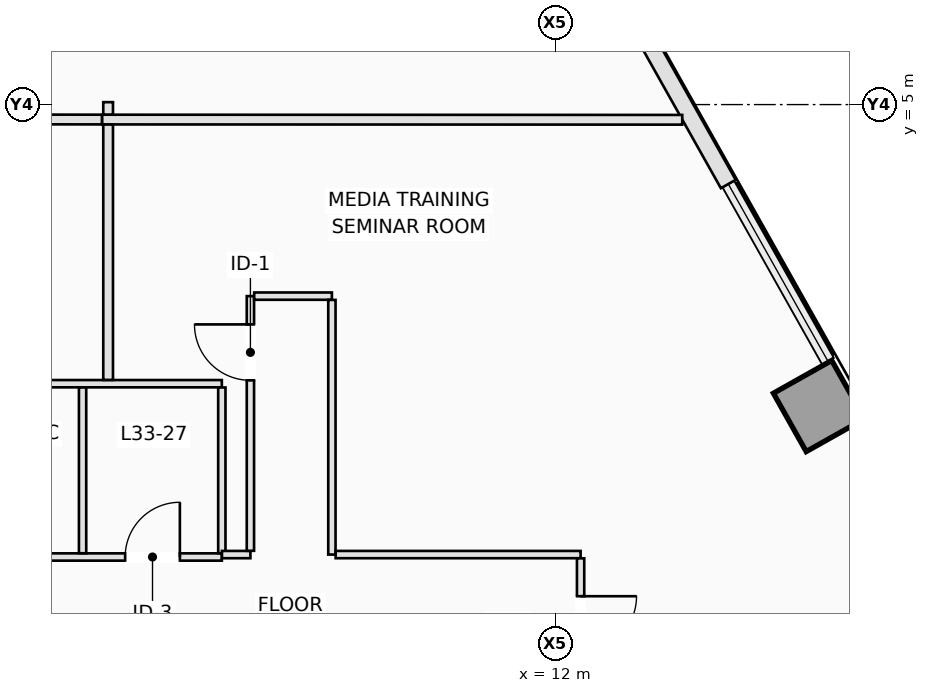
"""IFC4 building model, lengths in metres.
Left out: names, types, materials, properties, quantities, classifications, styles, units other than length and angle.
Written with IfcOpenShell. Run it as: python <this file> out.ifc"""

import sys

from ifc_helpers import new_model, si_unit, direction, frame, frame_2d, origin, origin_2d, place, context, subcontext, project, spatial, rectangle, extrude, element, fill, save


model = new_model("IFC4")
c1 = context("Model", 3, precision=1e-05, world=origin(), true_north=direction((0.0, 1.0)))
c2 = subcontext(c1, "Body", "Model", "MODEL_VIEW")
j1 = project(units=[si_unit("LENGTHUNIT", "METRE"), si_unit("PLANEANGLEUNIT", "RADIAN")], contexts=[c1])
p1 = place(None, origin())
s1 = spatial("IfcSite", under=j1, at=p1, CompositionType="ELEMENT")
p2 = place(p1, origin())
s2 = spatial("IfcBuilding", under=s1, at=p2, CompositionType="ELEMENT")
p3 = place(p2, frame((0.0, 0.0, 123.0)))
s3 = spatial("IfcBuildingStorey", under=s2, at=p3, CompositionType="ELEMENT", Elevation=123.0)
p4 = place(p3, frame((16.33, 0.043, 0.0), z_axis=(0.0, 0.0, 1.0), x_axis=(0.871575139605, 0.490261946333, 0.0)))
e1 = element("IfcColumn", 1, at=p4, inside=s3, PredefinedType="COLUMN", context=c2, shape_type="SweptSolid", body=[
    extrude(rectangle(XDim=1.1, YDim=1.1, at=origin_2d()), origin(), (0.0, 0.0, 1.0), 3.5),
])
p5 = place(p3, frame((13.232, 6.55, 0.0), z_axis=(0.0, 0.0, 1.0), x_axis=(0.490310760781, -0.871547679626, 0.0)))
e2 = element("IfcWall", 2, at=p5, inside=s3, PredefinedType="STANDARD", context=c2, shape_type="SweptSolid", body=[
    extrude(rectangle(XDim=3.277, YDim=0.28, at=frame_2d((1.638, 0.0))), origin(), (0.0, 0.0, 1.0), 3.25),
])
p6 = place(p3, frame((1.94, -2.44, 0.0), z_axis=(0.0, 0.0, 1.0), x_axis=(1.0, 0.0, 0.0)))
e3 = element("IfcWall", 3, at=p6, inside=s3, PredefinedType="PARTITIONING", context=c2, shape_type="SweptSolid", body=[
    extrude(rectangle(XDim=4.57, YDim=0.12, at=frame_2d((2.285, 0.0))), origin(), (0.0, 0.0, 1.0), 3.25),
])
p7 = place(p6, frame((0.7, 0.0, 0.0)))
e4 = element("IfcOpeningElement", 4, at=p7, cuts=e3, PredefinedType="OPENING", context=c2, shape_type="SweptSolid", body=[
    extrude(rectangle(XDim=0.9, YDim=2.12, at=frame_2d((0.45, 1.06))), frame((0.0, 0.07, 0.0), z_axis=(0.0, -1.0, 0.0), x_axis=(1.0, 0.0, 0.0)), (0.0, 0.0, 1.0), 0.14),
])
p8 = place(p6, frame((2.98, 0.0, 0.0)))
e5 = element("IfcOpeningElement", 5, at=p8, cuts=e3, PredefinedType="OPENING", context=c2, shape_type="SweptSolid", body=[
    extrude(rectangle(XDim=0.9, YDim=2.12, at=frame_2d((0.45, 1.06))), frame((0.0, 0.07, 0.0), z_axis=(0.0, -1.0, 0.0), x_axis=(1.0, 0.0, 0.0)), (0.0, 0.0, 1.0), 0.14),
])
p9 = place(p3, frame((1.94, 0.41, 0.0), z_axis=(0.0, 0.0, 1.0), x_axis=(1.0, 0.0, 0.0)))
e6 = element("IfcWall", 6, at=p9, inside=s3, PredefinedType="PARTITIONING", context=c2, shape_type="SweptSolid", body=[
    extrude(rectangle(XDim=4.57, YDim=0.12, at=frame_2d((2.285, 0.0))), origin(), (0.0, 0.0, 1.0), 3.25),
])
p10 = place(p3, frame((4.22, -2.378, 0.0), z_axis=(0.0, 0.0, 1.0), x_axis=(0.0, 1.0, 0.0)))
e7 = element("IfcWall", 7, at=p10, inside=s3, PredefinedType="PARTITIONING", context=c2, shape_type="SweptSolid", body=[
    extrude(rectangle(XDim=2.726, YDim=0.12, at=frame_2d((1.363, 0.0))), origin(), (0.0, 0.0, 1.0), 2.648),
])
p11 = place(p3, frame((6.51, -2.378, 0.0), z_axis=(0.0, 0.0, 1.0), x_axis=(0.0, 1.0, 0.0)))
e8 = element("IfcWall", 8, at=p11, inside=s3, PredefinedType="PARTITIONING", context=c2, shape_type="SweptSolid", body=[
    extrude(rectangle(XDim=2.726, YDim=0.12, at=frame_2d((1.363, 0.0))), origin(), (0.0, 0.0, 1.0), 3.25),
])
p12 = place(p3, frame((6.512, -2.4, 0.0), z_axis=(0.0, 0.0, 1.0), x_axis=(1.0, 0.0, 0.0)))
e9 = element("IfcWall", 9, at=p12, inside=s3, PredefinedType="PARTITIONING", context=c2, shape_type="SweptSolid", body=[
    extrude(rectangle(XDim=0.468, YDim=0.12, at=frame_2d((0.234, 0.0))), origin(), (0.0, 0.0, 1.0), 3.25),
])
p13 = place(p3, frame((6.98, -2.338, 0.0), z_axis=(0.0, 0.0, 1.0), x_axis=(0.0, 1.0, 0.0)))
e10 = element("IfcWall", 10, at=p13, inside=s3, PredefinedType="PARTITIONING", context=c2, shape_type="SweptSolid", body=[
    extrude(rectangle(XDim=4.188, YDim=0.12, at=frame_2d((2.094, 0.0))), origin(), (0.0, 0.0, 1.0), 3.25),
])
p14 = place(p13, frame((2.803, 0.0, 0.0)))
e11 = element("IfcOpeningElement", 11, at=p14, cuts=e10, PredefinedType="OPENING", context=c2, shape_type="SweptSolid", body=[
    extrude(rectangle(XDim=0.92, YDim=2.12, at=frame_2d((0.46, 1.06))), frame((0.0, 0.07, 0.0), z_axis=(0.0, -1.0, 0.0), x_axis=(1.0, 0.0, 0.0)), (0.0, 0.0, 1.0), 0.14),
])
p15 = place(p3, frame((7.042, 1.85, 0.0), z_axis=(0.0, 0.0, 1.0), x_axis=(1.0, 0.0, 0.0)))
e12 = element("IfcWall", 12, at=p15, inside=s3, PredefinedType="PARTITIONING", context=c2, shape_type="SweptSolid", body=[
    extrude(rectangle(XDim=1.278, YDim=0.12, at=frame_2d((0.639, 0.0))), origin(), (0.0, 0.0, 1.0), 3.25),
])
p16 = place(p3, frame((8.32, 1.788, 0.0), z_axis=(0.0, 0.0, 1.0), x_axis=(0.0, -1.0, 0.0)))
e13 = element("IfcWall", 13, at=p16, inside=s3, PredefinedType="PARTITIONING", context=c2, shape_type="SweptSolid", body=[
    extrude(rectangle(XDim=4.188, YDim=0.12, at=frame_2d((2.094, 0.0))), origin(), (0.0, 0.0, 1.0), 3.25),
])
p17 = place(p3, frame((8.382, -2.4, 0.0), z_axis=(0.0, 0.0, 1.0), x_axis=(1.0, 0.0, 0.0)))
e14 = element("IfcWall", 14, at=p17, inside=s3, PredefinedType="PARTITIONING", context=c2, shape_type="SweptSolid", body=[
    extrude(rectangle(XDim=4.028, YDim=0.12, at=frame_2d((2.014, 0.0))), origin(), (0.0, 0.0, 1.0), 3.25),
])
p18 = place(p3, frame((12.41, -2.462, 0.0), z_axis=(0.0, 0.0, 1.0), x_axis=(0.0, -1.0, 0.0)))
e15 = element("IfcWall", 15, at=p18, inside=s3, PredefinedType="PARTITIONING", context=c2, shape_type="SweptSolid", body=[
    extrude(rectangle(XDim=1.786, YDim=0.12, at=frame_2d((0.893, 0.0))), origin(), (0.0, 0.0, 1.0), 3.25),
])
p19 = place(p18, frame((0.623, 0.0, 0.0)))
e16 = element("IfcOpeningElement", 16, at=p19, cuts=e15, PredefinedType="OPENING", context=c2, shape_type="SweptSolid", body=[
    extrude(rectangle(XDim=0.92, YDim=2.12, at=frame_2d((0.46, 1.06))), frame((0.0, 0.07, 0.0), z_axis=(0.0, -1.0, 0.0), x_axis=(1.0, 0.0, 0.0)), (0.0, 0.0, 1.0), 0.14),
])
p20 = place(p3, frame((14.082, 4.75, 0.0), z_axis=(0.0, 0.0, 1.0), x_axis=(-0.999999926346, 0.000383808375, 0.0)))
e17 = element("IfcWall", 17, at=p20, inside=s3, PredefinedType="PARTITIONING", context=c2, shape_type="SweptSolid", body=[
    extrude(rectangle(XDim=9.542, YDim=0.16, at=frame_2d((4.771, 0.0))), origin(), (0.0, 0.0, 1.0), 3.25),
])
p21 = place(p3, frame((4.538, 4.754, 0.0), z_axis=(0.0, 0.0, 1.0), x_axis=(-0.999999181944, 0.001279105904, 0.0)))
e18 = element("IfcWall", 18, at=p21, inside=s3, PredefinedType="PARTITIONING", context=c2, shape_type="SweptSolid", body=[
    extrude(rectangle(XDim=8.398, YDim=0.16, at=frame_2d((4.199, 0.0))), origin(), (0.0, 0.0, 1.0), 3.25),
])
p22 = place(p3, frame((4.64, 0.472, 0.0), z_axis=(0.0, 0.0, 1.0), x_axis=(0.0, 1.0, 0.0)))
e19 = element("IfcWall", 19, at=p22, inside=s3, PredefinedType="PARTITIONING", context=c2, shape_type="SweptSolid", body=[
    extrude(rectangle(XDim=4.2, YDim=0.16, at=frame_2d((2.1, 0.0))), origin(), (0.0, 0.0, 1.0), 3.25),
])
p23 = place(p3, frame((4.64, 4.836, 0.0), z_axis=(0.0, 0.0, 1.0), x_axis=(0.0, 1.0, 0.0)))
e20 = element("IfcWall", 20, at=p23, inside=s3, PredefinedType="PARTITIONING", context=c2, shape_type="SweptSolid", body=[
    extrude(rectangle(XDim=0.204, YDim=0.16, at=frame_2d((0.102, 0.0))), origin(), (0.0, 0.0, 1.0), 3.25),
])
p24 = place(p8, origin())
e21 = element("IfcDoor", 21, at=p24, inside=s3, OperationType="SINGLE_SWING_RIGHT", PredefinedType="DOOR", context=c2, shape_type="SweptSolid", body=[
    extrude(rectangle(XDim=0.9, YDim=2.12, at=frame_2d((0.45, 1.06))), frame((0.0, 0.025, 0.0), z_axis=(0.0, -1.0, 0.0), x_axis=(1.0, 0.0, 0.0)), (0.0, 0.0, 1.0), 0.05),
])
fill(e5, e21)
p25 = place(p14, origin())
e22 = element("IfcDoor", 22, at=p25, inside=s3, OperationType="SINGLE_SWING_RIGHT", PredefinedType="DOOR", context=c2, shape_type="SweptSolid", body=[
    extrude(rectangle(XDim=0.92, YDim=2.12, at=frame_2d((0.46, 1.06))), frame((0.0, 0.025, 0.0), z_axis=(0.0, -1.0, 0.0), x_axis=(1.0, 0.0, 0.0)), (0.0, 0.0, 1.0), 0.05),
])
fill(e11, e22)
p26 = place(p19, origin())
e23 = element("IfcDoor", 23, at=p26, inside=s3, OperationType="SINGLE_SWING_LEFT", PredefinedType="DOOR", context=c2, shape_type="SweptSolid", body=[
    extrude(rectangle(XDim=0.92, YDim=2.12, at=frame_2d((0.46, 1.06))), frame((0.0, 0.025, 0.0), z_axis=(0.0, -1.0, 0.0), x_axis=(1.0, 0.0, 0.0)), (0.0, 0.0, 1.0), 0.05),
])
fill(e16, e23)
save(model, sys.argv[1])
